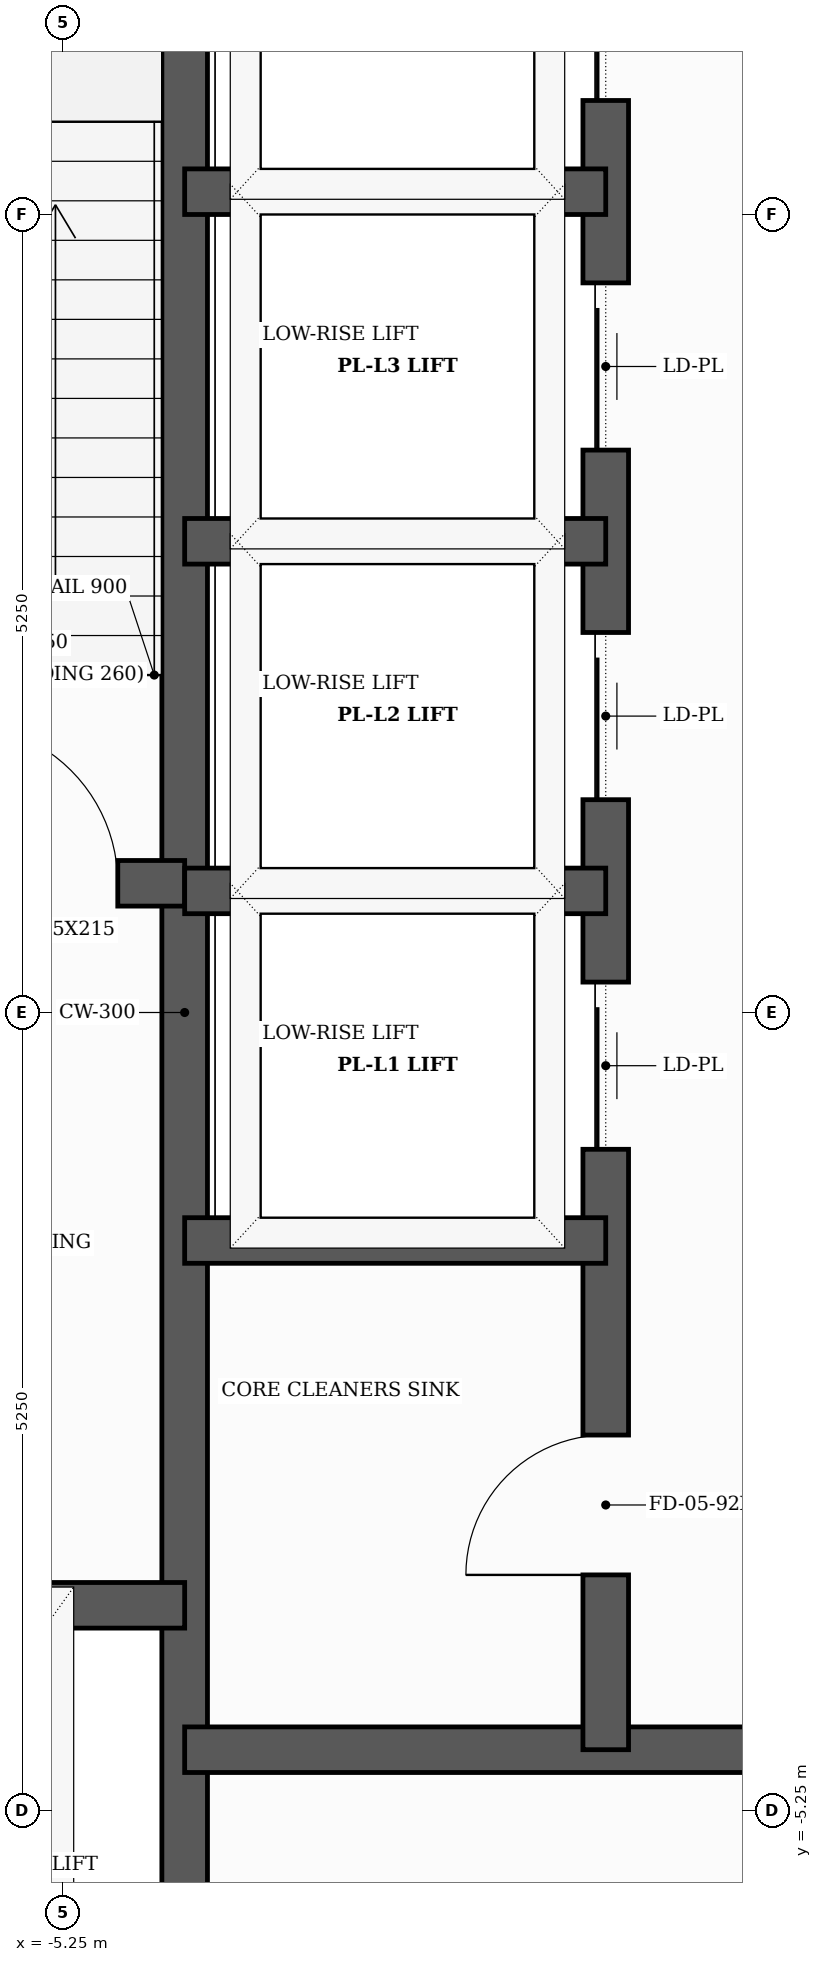
"""IFC4 building model, lengths in metres.
Left out: names, types, materials, properties, quantities, classifications, styles, units other than length and angle.
Written with IfcOpenShell. Run it as: python <this file> out.ifc"""

import sys

from ifc_helpers import new_model, si_unit, direction, frame, frame_2d, origin, place, context, subcontext, project, spatial, rectangle, extrude, element, fill, save


model = new_model("IFC4")
c1 = context("Model", 3, precision=1e-05, world=origin(), true_north=direction((0.0, 1.0)))
c2 = subcontext(c1, "Body", "Model", "MODEL_VIEW")
j1 = project(units=[si_unit("LENGTHUNIT", "METRE"), si_unit("PLANEANGLEUNIT", "RADIAN")], contexts=[c1])
p1 = place(None, origin())
s1 = spatial("IfcSite", under=j1, at=p1, CompositionType="ELEMENT")
p2 = place(p1, origin())
s2 = spatial("IfcBuilding", under=s1, at=p2, CompositionType="ELEMENT")
p3 = place(p2, frame((0.0, 0.0, 85.2)))
s3 = spatial("IfcBuildingStorey", under=s2, at=p3, CompositionType="ELEMENT", Elevation=85.2)
p4 = place(p3, frame((30.436, -3.14, 0.0), z_axis=(0.0, 0.0, 1.0), x_axis=(-0.743144101168, 0.669131410785, 0.0)))
e1 = element("IfcWall", 1, at=p4, inside=s3, PredefinedType="SOLIDWALL", context=c2, shape_type="SweptSolid", body=[
    extrude(rectangle(XDim=49.44, YDim=0.22, at=frame_2d((24.72, 0.0))), origin(), (0.0, 0.0, 1.0), 4.4),
])
p5 = place(p3, frame((-4.45, -7.79, 0.0), z_axis=(0.0, 0.0, 1.0), x_axis=(0.0, 1.0, 0.0)))
e2 = element("IfcWall", 2, at=p5, inside=s3, PredefinedType="SHEAR", context=c2, shape_type="SweptSolid", body=[
    extrude(rectangle(XDim=15.58, YDim=0.3, at=frame_2d((7.79, 0.0))), origin(), (0.0, 0.0, 1.0), 4.9),
])
p6 = place(p3, frame((-7.79, 0.85, 0.0), z_axis=(0.0, 0.0, 1.0), x_axis=(1.0, 0.0, 0.0)))
e3 = element("IfcWall", 3, at=p6, inside=s3, PredefinedType="SHEAR", context=c2, shape_type="SweptSolid", body=[
    extrude(rectangle(XDim=3.34, YDim=0.3, at=frame_2d((1.67, 0.0))), origin(), (0.0, 0.0, 1.0), 4.9),
])
p7 = place(p6, frame((1.85, 0.0, 0.0)))
e4 = element("IfcOpeningElement", 4, at=p7, cuts=e3, PredefinedType="OPENING", context=c2, shape_type="SweptSolid", body=[
    extrude(rectangle(XDim=1.05, YDim=2.15, at=frame_2d((0.525, 1.075))), frame((0.0, 0.16, 0.0), z_axis=(0.0, -1.0, 0.0), x_axis=(1.0, 0.0, 0.0)), (0.0, 0.0, 1.0), 0.32),
])
p8 = place(p3, frame((-7.79, -3.9, 0.0), z_axis=(0.0, 0.0, 1.0), x_axis=(1.0, 0.0, 0.0)))
e5 = element("IfcWall", 5, at=p8, inside=s3, PredefinedType="SHEAR", context=c2, shape_type="SweptSolid", body=[
    extrude(rectangle(XDim=3.34, YDim=0.3, at=frame_2d((1.67, 0.0))), origin(), (0.0, 0.0, 1.0), 4.9),
])
p9 = place(p8, frame((1.27, 0.0, 0.0)))
e6 = element("IfcOpeningElement", 6, at=p9, cuts=e5, PredefinedType="OPENING", context=c2, shape_type="SweptSolid", body=[
    extrude(rectangle(XDim=1.1, YDim=2.1, at=frame_2d((0.55, 1.05))), frame((0.0, 0.16, 0.0), z_axis=(0.0, -1.0, 0.0), x_axis=(1.0, 0.0, 0.0)), (0.0, 0.0, 1.0), 0.32),
])
p10 = place(p3, frame((-4.45, -4.85, 0.0), z_axis=(0.0, 0.0, 1.0), x_axis=(1.0, 0.0, 0.0)))
e7 = element("IfcWall", 7, at=p10, inside=s3, PredefinedType="SHEAR", context=c2, shape_type="SweptSolid", body=[
    extrude(rectangle(XDim=8.9, YDim=0.3, at=frame_2d((4.45, 0.0))), origin(), (0.0, 0.0, 1.0), 4.9),
])
p11 = place(p3, frame((-1.68, -4.85, 0.0), z_axis=(0.0, 0.0, 1.0), x_axis=(0.0, 1.0, 0.0)))
e8 = element("IfcWall", 8, at=p11, inside=s3, PredefinedType="SHEAR", context=c2, shape_type="SweptSolid", body=[
    extrude(rectangle(XDim=12.64, YDim=0.3, at=frame_2d((6.32, 0.0))), origin(), (0.0, 0.0, 1.0), 4.9),
])
p12 = place(p11, frame((3.95, 0.0, 0.0)))
e9 = element("IfcOpeningElement", 9, at=p12, cuts=e8, PredefinedType="OPENING", context=c2, shape_type="SweptSolid", body=[
    extrude(rectangle(XDim=1.1, YDim=2.1, at=frame_2d((0.55, 1.05))), frame((0.0, 0.16, 0.0), z_axis=(0.0, -1.0, 0.0), x_axis=(1.0, 0.0, 0.0)), (0.0, 0.0, 1.0), 0.32),
])
p13 = place(p11, frame((6.25, 0.0, 0.0)))
e10 = element("IfcOpeningElement", 10, at=p13, cuts=e8, PredefinedType="OPENING", context=c2, shape_type="SweptSolid", body=[
    extrude(rectangle(XDim=1.1, YDim=2.1, at=frame_2d((0.55, 1.05))), frame((0.0, 0.16, 0.0), z_axis=(0.0, -1.0, 0.0), x_axis=(1.0, 0.0, 0.0)), (0.0, 0.0, 1.0), 0.32),
])
p14 = place(p11, frame((8.55, 0.0, 0.0)))
e11 = element("IfcOpeningElement", 11, at=p14, cuts=e8, PredefinedType="OPENING", context=c2, shape_type="SweptSolid", body=[
    extrude(rectangle(XDim=1.1, YDim=2.1, at=frame_2d((0.55, 1.05))), frame((0.0, 0.16, 0.0), z_axis=(0.0, -1.0, 0.0), x_axis=(1.0, 0.0, 0.0)), (0.0, 0.0, 1.0), 0.32),
])
p15 = place(p11, frame((10.85, 0.0, 0.0)))
e12 = element("IfcOpeningElement", 12, at=p15, cuts=e8, PredefinedType="OPENING", context=c2, shape_type="SweptSolid", body=[
    extrude(rectangle(XDim=1.1, YDim=2.1, at=frame_2d((0.55, 1.05))), frame((0.0, 0.16, 0.0), z_axis=(0.0, -1.0, 0.0), x_axis=(1.0, 0.0, 0.0)), (0.0, 0.0, 1.0), 0.32),
])
p16 = place(p11, frame((1.15, 0.0, 0.0)))
e13 = element("IfcOpeningElement", 13, at=p16, cuts=e8, PredefinedType="OPENING", context=c2, shape_type="SweptSolid", body=[
    extrude(rectangle(XDim=0.92, YDim=2.1, at=frame_2d((0.46, 1.05))), frame((0.0, 0.16, 0.0), z_axis=(0.0, -1.0, 0.0), x_axis=(1.0, 0.0, 0.0)), (0.0, 0.0, 1.0), 0.32),
])
for number, where, z_axis, x_axis in (
    (14, (-4.45, -1.5, 0.0), (0.0, 0.0, 1.0), (1.0, 0.0, 0.0)),
    (15, (-4.45, 0.8, 0.0), (0.0, 0.0, 1.0), (1.0, 0.0, 0.0)),
    (16, (-4.45, 3.1, 0.0), (0.0, 0.0, 1.0), (1.0, 0.0, 0.0)),
    (17, (-4.45, 5.4, 0.0), (0.0, 0.0, 1.0), (1.0, 0.0, 0.0)),
):
    element("IfcWall", number, at=place(p3, frame(where, z_axis=z_axis, x_axis=x_axis)), inside=s3, PredefinedType="SHEAR", context=c2, shape_type="SweptSolid", body=[
        extrude(rectangle(XDim=2.77, YDim=0.3, at=frame_2d((1.385, 0.0))), origin(), (0.0, 0.0, 1.0), 4.9),
    ])
p17 = place(p3, frame((-7.036, 28.85, 0.0), z_axis=(0.0, 0.0, 1.0), x_axis=(0.743144937383, -0.669130482075, 0.0)))
e18 = element("IfcWall", 18, at=p17, inside=s3, PredefinedType="SOLIDWALL", context=c2, shape_type="SweptSolid", body=[
    extrude(rectangle(XDim=49.066, YDim=0.16, at=frame_2d((24.533, 0.0))), origin(), (0.0, 0.0, 1.0), 3.485),
])
p18 = place(p7, origin())
e19 = element("IfcDoor", 19, at=p18, inside=s3, OperationType="SINGLE_SWING_LEFT", PredefinedType="DOOR", context=c2, shape_type="SweptSolid", body=[
    extrude(rectangle(XDim=1.05, YDim=2.15, at=frame_2d((0.525, 1.075))), frame((0.0, 0.025, 0.0), z_axis=(0.0, -1.0, 0.0), x_axis=(1.0, 0.0, 0.0)), (0.0, 0.0, 1.0), 0.05),
])
fill(e4, e19)
p19 = place(p12, origin())
e20 = element("IfcDoor", 20, at=p19, inside=s3, OperationType="SLIDING_TO_LEFT", PredefinedType="DOOR", context=c2, shape_type="SweptSolid", body=[
    extrude(rectangle(XDim=1.1, YDim=2.1, at=frame_2d((0.55, 1.05))), frame((0.0, 0.025, 0.0), z_axis=(0.0, -1.0, 0.0), x_axis=(1.0, 0.0, 0.0)), (0.0, 0.0, 1.0), 0.05),
])
fill(e9, e20)
p20 = place(p13, origin())
e21 = element("IfcDoor", 21, at=p20, inside=s3, OperationType="SLIDING_TO_LEFT", PredefinedType="DOOR", context=c2, shape_type="SweptSolid", body=[
    extrude(rectangle(XDim=1.1, YDim=2.1, at=frame_2d((0.55, 1.05))), frame((0.0, 0.025, 0.0), z_axis=(0.0, -1.0, 0.0), x_axis=(1.0, 0.0, 0.0)), (0.0, 0.0, 1.0), 0.05),
])
fill(e10, e21)
p21 = place(p14, origin())
e22 = element("IfcDoor", 22, at=p21, inside=s3, OperationType="SLIDING_TO_LEFT", PredefinedType="DOOR", context=c2, shape_type="SweptSolid", body=[
    extrude(rectangle(XDim=1.1, YDim=2.1, at=frame_2d((0.55, 1.05))), frame((0.0, 0.025, 0.0), z_axis=(0.0, -1.0, 0.0), x_axis=(1.0, 0.0, 0.0)), (0.0, 0.0, 1.0), 0.05),
])
fill(e11, e22)
p22 = place(p15, origin())
e23 = element("IfcDoor", 23, at=p22, inside=s3, OperationType="SLIDING_TO_LEFT", PredefinedType="DOOR", context=c2, shape_type="SweptSolid", body=[
    extrude(rectangle(XDim=1.1, YDim=2.1, at=frame_2d((0.55, 1.05))), frame((0.0, 0.025, 0.0), z_axis=(0.0, -1.0, 0.0), x_axis=(1.0, 0.0, 0.0)), (0.0, 0.0, 1.0), 0.05),
])
fill(e12, e23)
p23 = place(p16, origin())
e24 = element("IfcDoor", 24, at=p23, inside=s3, OperationType="SINGLE_SWING_LEFT", PredefinedType="DOOR", context=c2, shape_type="SweptSolid", body=[
    extrude(rectangle(XDim=0.92, YDim=2.1, at=frame_2d((0.46, 1.05))), frame((0.0, 0.025, 0.0), z_axis=(0.0, -1.0, 0.0), x_axis=(1.0, 0.0, 0.0)), (0.0, 0.0, 1.0), 0.05),
])
fill(e13, e24)
save(model, sys.argv[1])
